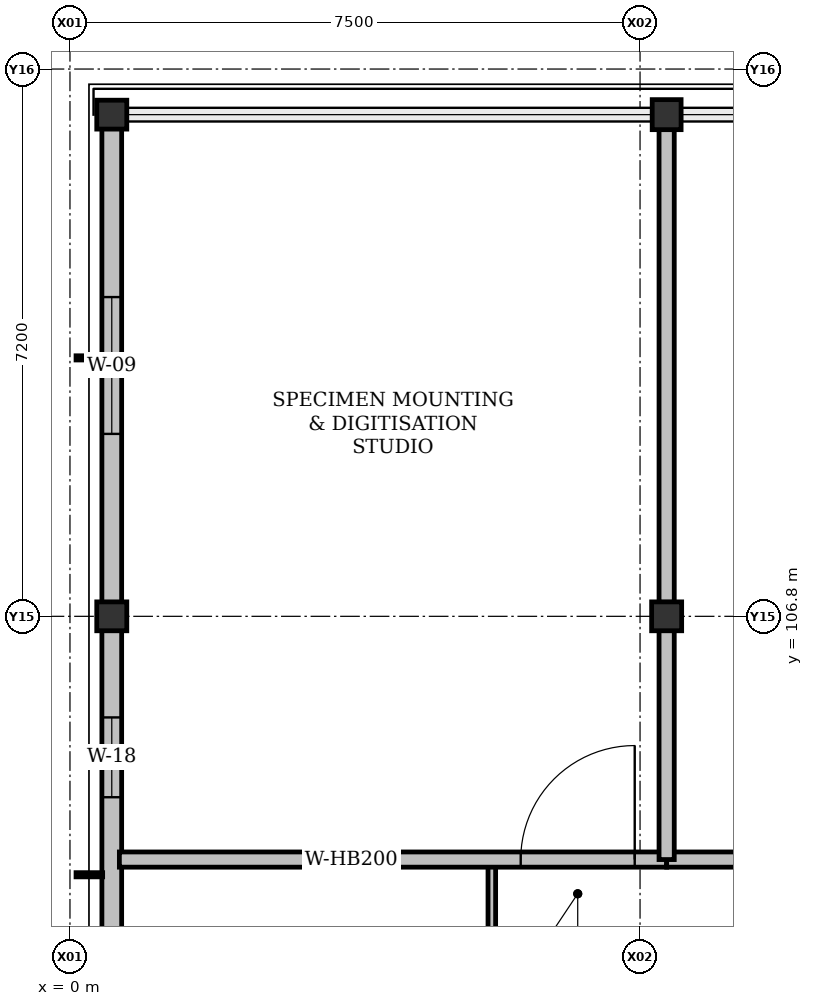
"""IFC4 building model, lengths in metres.
Left out: names, types, materials, properties, quantities, classifications, styles, units other than length and angle.
Written with IfcOpenShell. Run it as: python <this file> out.ifc"""

import sys

from ifc_helpers import new_model, si_unit, direction, frame, frame_2d, origin, origin_2d, place, context, subcontext, project, spatial, rectangle, i_section, extrude, element, fill, save


model = new_model("IFC4")
c1 = context("Model", 3, precision=1e-05, world=origin(), true_north=direction((0.0, 1.0)))
c2 = subcontext(c1, "Body", "Model", "MODEL_VIEW")
j1 = project(units=[si_unit("LENGTHUNIT", "METRE"), si_unit("PLANEANGLEUNIT", "RADIAN")], contexts=[c1])
p1 = place(None, origin())
s1 = spatial("IfcSite", under=j1, at=p1, CompositionType="ELEMENT")
p2 = place(p1, origin())
s2 = spatial("IfcBuilding", under=s1, at=p2, CompositionType="ELEMENT")
p3 = place(p2, frame((0.0, 0.0, 9.9)))
s3 = spatial("IfcBuildingStorey", under=s2, at=p3, CompositionType="ELEMENT", Elevation=9.9)
for number, where, z_axis, x_axis in (
    (1, (0.55, 106.8, 0.0), (0.0, 0.0, 1.0), (1.0, 0.0, 0.0)),
    (2, (7.85, 106.8, 0.0), (0.0, 0.0, 1.0), (1.0, 0.0, 0.0)),
    (3, (0.55, 113.4, 0.0), (0.0, 0.0, 1.0), (1.0, 0.0, 0.0)),
    (4, (7.85, 113.4, 0.0), (0.0, 0.0, 1.0), (0.0, 1.0, 0.0)),
):
    element("IfcColumn", number, at=place(p3, frame(where, z_axis=z_axis, x_axis=x_axis)), inside=s3, PredefinedType="COLUMN", context=c2, shape_type="SweptSolid", body=[
        extrude(i_section(OverallWidth=0.395, OverallDepth=0.38, WebThickness=0.019, FlangeThickness=0.03, FilletRadius=0.015, at=origin_2d()), origin(), (0.0, 0.0, 1.0), 4.2),
    ])
p4 = place(p3, frame((0.55, 99.6, 0.0), z_axis=(0.0, 0.0, 1.0), x_axis=(0.0, 1.0, 0.0)))
e5 = element("IfcWall", 5, at=p4, inside=s3, PredefinedType="SOLIDWALL", context=c2, shape_type="SweptSolid", body=[
    extrude(rectangle(XDim=7.2, YDim=0.26, at=frame_2d((3.6, 0.0))), origin(), (0.0, 0.0, 1.0), 3.592),
])
p5 = place(p4, frame((1.505, 0.0, 0.92)))
e6 = element("IfcOpeningElement", 6, at=p5, cuts=e5, PredefinedType="OPENING", context=c2, shape_type="SweptSolid", body=[
    extrude(rectangle(XDim=1.5, YDim=1.55, at=frame_2d((0.75, 0.775))), frame((0.0, 0.13, 0.0), z_axis=(0.0, -1.0, 0.0), x_axis=(1.0, 0.0, 0.0)), (0.0, 0.0, 1.0), 0.26),
])
p6 = place(p4, frame((4.82, 0.0, 0.92)))
e7 = element("IfcOpeningElement", 7, at=p6, cuts=e5, PredefinedType="OPENING", context=c2, shape_type="SweptSolid", body=[
    extrude(rectangle(XDim=1.05, YDim=1.3, at=frame_2d((0.525, 0.65))), frame((0.0, 0.13, 0.0), z_axis=(0.0, -1.0, 0.0), x_axis=(1.0, 0.0, 0.0)), (0.0, 0.0, 1.0), 0.26),
])
p7 = place(p3, frame((0.55, 106.8, 0.0), z_axis=(0.0, 0.0, 1.0), x_axis=(0.0, 1.0, 0.0)))
e8 = element("IfcWall", 8, at=p7, inside=s3, PredefinedType="SOLIDWALL", context=c2, shape_type="SweptSolid", body=[
    extrude(rectangle(XDim=6.6, YDim=0.26, at=frame_2d((3.3, 0.0))), origin(), (0.0, 0.0, 1.0), 3.592),
])
p8 = place(p7, frame((2.4, 0.0, 0.92)))
e9 = element("IfcOpeningElement", 9, at=p8, cuts=e8, PredefinedType="OPENING", context=c2, shape_type="SweptSolid", body=[
    extrude(rectangle(XDim=1.8, YDim=1.55, at=frame_2d((0.9, 0.775))), frame((0.0, 0.13, 0.0), z_axis=(0.0, -1.0, 0.0), x_axis=(1.0, 0.0, 0.0)), (0.0, 0.0, 1.0), 0.26),
])
p9 = place(p3, frame((5.55, 85.2, 0.0), z_axis=(0.0, 0.0, 1.0), x_axis=(0.0, 1.0, 0.0)))
e10 = element("IfcWall", 10, at=p9, inside=s3, PredefinedType="PARTITIONING", context=c2, shape_type="SweptSolid", body=[
    extrude(rectangle(XDim=18.4, YDim=0.1, at=frame_2d((9.2, 0.0))), origin(), (0.0, 0.0, 1.0), 3.466),
])
p10 = place(p9, frame((8.75, 0.0, 0.0)))
e11 = element("IfcOpeningElement", 11, at=p10, cuts=e10, PredefinedType="OPENING", context=c2, shape_type="SweptSolid", body=[
    extrude(rectangle(XDim=0.9, YDim=2.08, at=frame_2d((0.45, 1.04))), frame((0.0, 0.05, 0.0), z_axis=(0.0, -1.0, 0.0), x_axis=(1.0, 0.0, 0.0)), (0.0, 0.0, 1.0), 0.1),
])
p11 = place(p9, frame((10.5, 0.0, 0.92)))
e12 = element("IfcOpeningElement", 12, at=p11, cuts=e10, PredefinedType="OPENING", context=c2, shape_type="SweptSolid", body=[
    extrude(rectangle(XDim=1.25, YDim=1.1, at=frame_2d((0.625, 0.55))), frame((0.0, 0.05, 0.0), z_axis=(0.0, -1.0, 0.0), x_axis=(1.0, 0.0, 0.0)), (0.0, 0.0, 1.0), 0.1),
])
p12 = place(p3, frame((0.65, 103.6, 0.0), z_axis=(0.0, 0.0, 1.0), x_axis=(1.0, 0.0, 0.0)))
e13 = element("IfcWall", 13, at=p12, inside=s3, PredefinedType="SOLIDWALL", context=c2, shape_type="SweptSolid", body=[
    extrude(rectangle(XDim=7.2, YDim=0.2, at=frame_2d((3.6, 0.0))), origin(), (0.0, 0.0, 1.0), 3.542),
])
p13 = place(p12, frame((5.28, 0.0, 0.0)))
e14 = element("IfcOpeningElement", 14, at=p13, cuts=e13, PredefinedType="OPENING", context=c2, shape_type="SweptSolid", body=[
    extrude(rectangle(XDim=1.5, YDim=2.3, at=frame_2d((0.75, 1.15))), frame((0.0, 0.1, 0.0), z_axis=(0.0, -1.0, 0.0), x_axis=(1.0, 0.0, 0.0)), (0.0, 0.0, 1.0), 0.2),
])
p14 = place(p3, frame((7.85, 103.6, 0.0), z_axis=(0.0, 0.0, 1.0), x_axis=(1.0, 0.0, 0.0)))
e15 = element("IfcWall", 15, at=p14, inside=s3, PredefinedType="SOLIDWALL", context=c2, shape_type="SweptSolid", body=[
    extrude(rectangle(XDim=21.065, YDim=0.2, at=frame_2d((10.532, 0.0))), origin(), (0.0, 0.0, 1.0), 3.542),
])
p15 = place(p14, frame((2.075, 0.0, 0.0)))
e16 = element("IfcOpeningElement", 16, at=p15, cuts=e15, PredefinedType="OPENING", context=c2, shape_type="SweptSolid", body=[
    extrude(rectangle(XDim=1.35, YDim=2.25, at=frame_2d((0.675, 1.125))), frame((0.0, 0.1, 0.0), z_axis=(0.0, -1.0, 0.0), x_axis=(1.0, 0.0, 0.0)), (0.0, 0.0, 1.0), 0.2),
])
p16 = place(p3, frame((7.85, 106.615, 0.0), z_axis=(0.0, 0.0, 1.0), x_axis=(0.0, -1.0, 0.0)))
e17 = element("IfcWall", 17, at=p16, inside=s3, PredefinedType="SOLIDWALL", context=c2, shape_type="SweptSolid", body=[
    extrude(rectangle(XDim=3.015, YDim=0.2, at=frame_2d((1.507, 0.0))), origin(), (0.0, 0.0, 1.0), 3.542),
])
p17 = place(p3, frame((7.85, 113.35, 0.0), z_axis=(0.0, 0.0, 1.0), x_axis=(0.0, -1.0, 0.0)))
e18 = element("IfcWall", 18, at=p17, inside=s3, PredefinedType="SOLIDWALL", context=c2, shape_type="SweptSolid", body=[
    extrude(rectangle(XDim=6.365, YDim=0.2, at=frame_2d((3.183, 0.0))), origin(), (0.0, 0.0, 1.0), 3.542),
])
p18 = place(p6, origin())
e19 = element("IfcWindow", 19, at=p18, inside=s3, PartitioningType="SINGLE_PANEL", PredefinedType="WINDOW", context=c2, shape_type="SweptSolid", body=[
    extrude(rectangle(XDim=1.05, YDim=1.3, at=frame_2d((0.525, 0.65))), frame((0.0, 0.03, 0.0), z_axis=(0.0, -1.0, 0.0), x_axis=(1.0, 0.0, 0.0)), (0.0, 0.0, 1.0), 0.06),
])
fill(e7, e19)
p19 = place(p8, origin())
e20 = element("IfcWindow", 20, at=p19, inside=s3, PartitioningType="DOUBLE_PANEL_VERTICAL", PredefinedType="WINDOW", context=c2, shape_type="SweptSolid", body=[
    extrude(rectangle(XDim=1.8, YDim=1.55, at=frame_2d((0.9, 0.775))), frame((0.0, 0.03, 0.0), z_axis=(0.0, -1.0, 0.0), x_axis=(1.0, 0.0, 0.0)), (0.0, 0.0, 1.0), 0.06),
])
fill(e9, e20)
p20 = place(p13, origin())
e21 = element("IfcDoor", 21, at=p20, inside=s3, OperationType="SINGLE_SWING_RIGHT", PredefinedType="DOOR", context=c2, shape_type="SweptSolid", body=[
    extrude(rectangle(XDim=1.5, YDim=2.3, at=frame_2d((0.75, 1.15))), frame((0.0, 0.025, 0.0), z_axis=(0.0, -1.0, 0.0), x_axis=(1.0, 0.0, 0.0)), (0.0, 0.0, 1.0), 0.05),
])
fill(e14, e21)
save(model, sys.argv[1])
